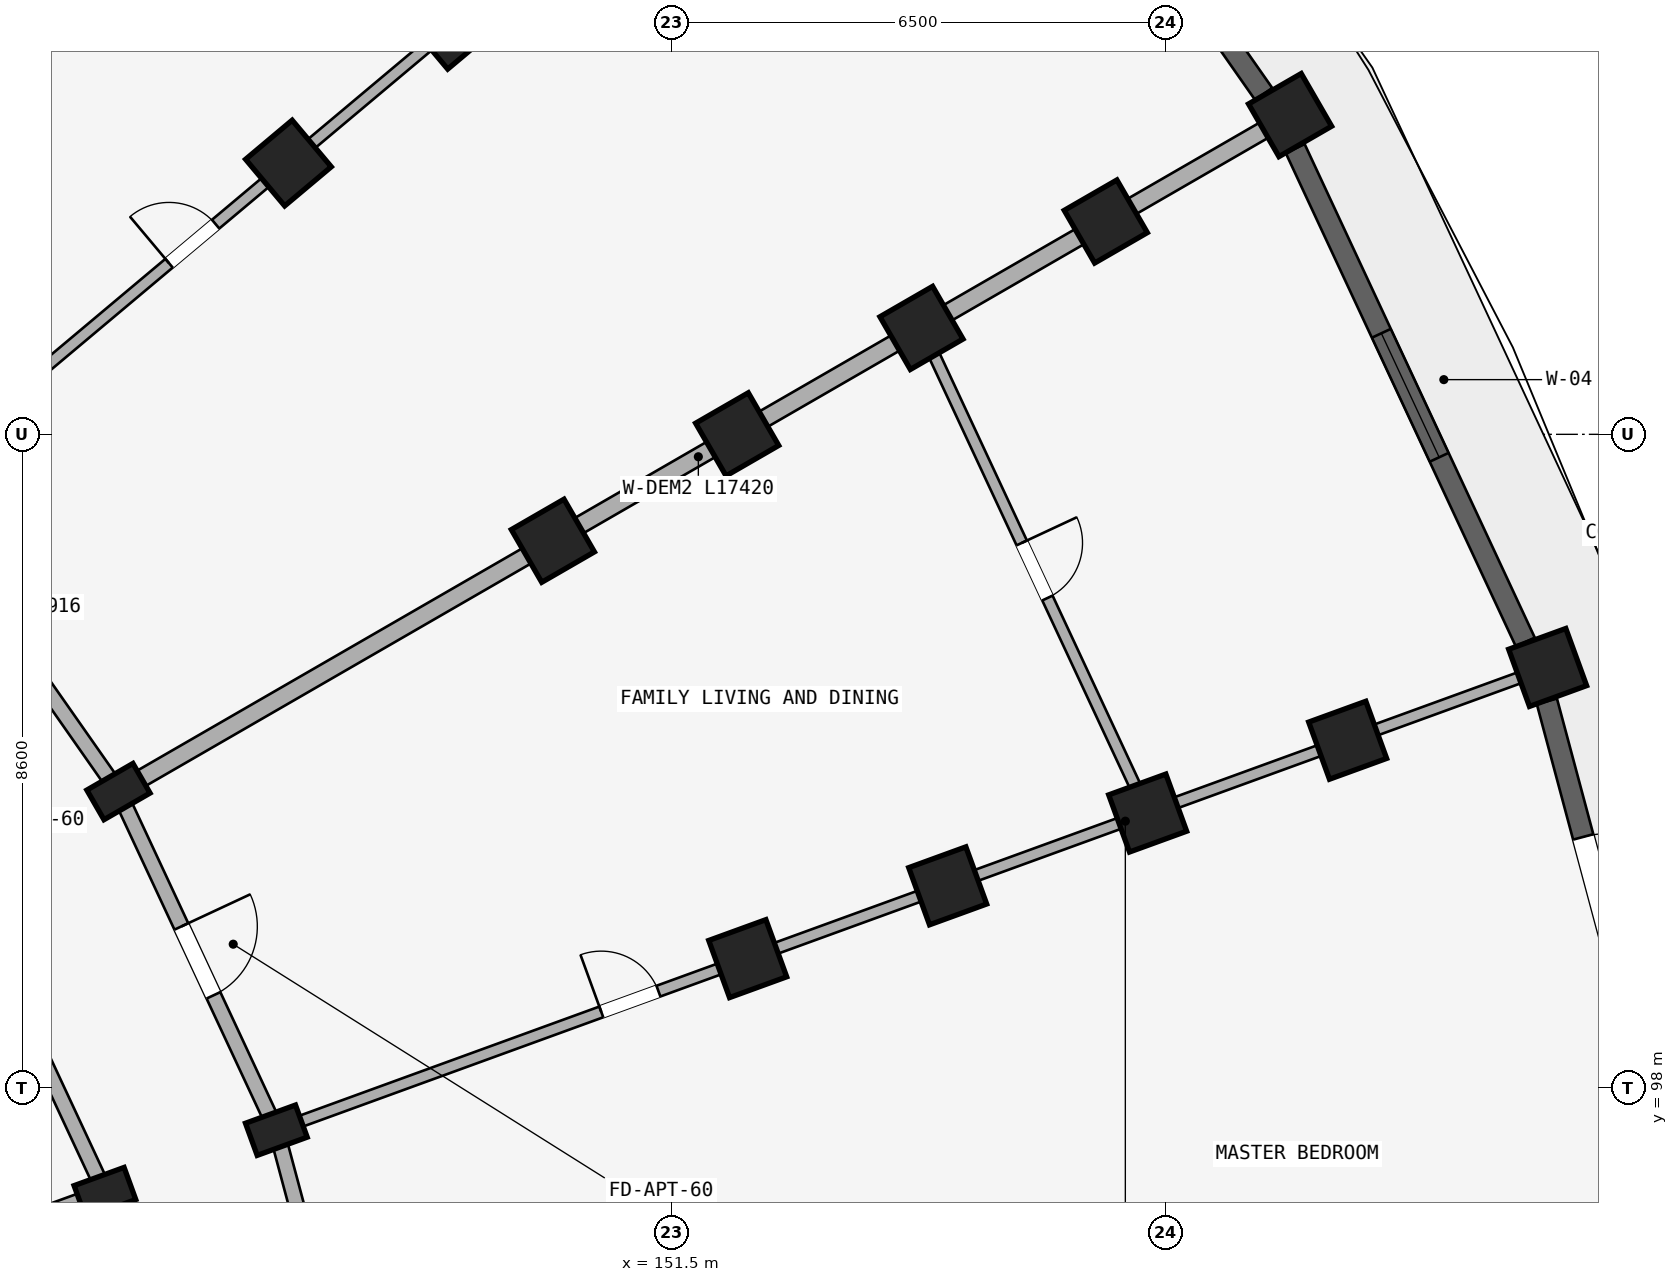
"""IFC4 building model, lengths in metres.
Left out: names, types, materials, properties, quantities, classifications, styles, units other than length and angle.
Written with IfcOpenShell. Run it as: python <this file> out.ifc"""

import sys

from ifc_helpers import new_model, si_unit, direction, frame, frame_2d, origin, origin_2d, place, context, subcontext, project, spatial, rectangle, extrude, element, fill, save


model = new_model("IFC4")
c1 = context("Model", 3, precision=1e-05, world=origin(), true_north=direction((0.0, 1.0)))
c2 = subcontext(c1, "Body", "Model", "MODEL_VIEW")
j1 = project(units=[si_unit("LENGTHUNIT", "METRE"), si_unit("PLANEANGLEUNIT", "RADIAN")], contexts=[c1])
p1 = place(None, origin())
s1 = spatial("IfcSite", under=j1, at=p1, CompositionType="ELEMENT")
p2 = place(p1, origin())
s2 = spatial("IfcBuilding", under=s1, at=p2, CompositionType="ELEMENT")
p3 = place(p2, frame((0.0, 0.0, 11.85)))
s3 = spatial("IfcBuildingStorey", under=s2, at=p3, CompositionType="ELEMENT", Elevation=11.85)
for number, where, z_axis, x_axis in (
    (1, (146.458, 110.169, 0.0), (0.0, 0.0, 1.0), (-0.643, 0.766, 0.0)),
    (2, (148.603, 111.969, 0.0), (0.0, 0.0, 1.0), (-0.643, 0.766, 0.0)),
):
    element("IfcColumn", number, at=place(p3, frame(where, z_axis=z_axis, x_axis=x_axis)), inside=s3, PredefinedType="COLUMN", context=c2, shape_type="SweptSolid", body=[
        extrude(rectangle(XDim=0.8, YDim=0.8, at=origin_2d()), origin(), (0.0, 0.0, 1.0), 2.93),
    ])
p4 = place(p3, frame((144.222, 101.9, 0.0), z_axis=(0.0, 0.0, 1.0), x_axis=(-0.5, 0.866025403784, 0.0)))
e3 = element("IfcColumn", 3, at=p4, inside=s3, PredefinedType="COLUMN", context=c2, shape_type="SweptSolid", body=[
    extrude(rectangle(XDim=0.45, YDim=0.7, at=origin_2d()), origin(), (0.0, 0.0, 1.0), 2.93),
])
for number, where, z_axis, x_axis in (
    (4, (149.938, 105.2, 0.0), (0.0, 0.0, 1.0), (-0.5, 0.866, 0.0)),
    (5, (152.363, 106.6, 0.0), (0.0, 0.0, 1.0), (-0.5, 0.866, 0.0)),
    (6, (154.787, 108.0, 0.0), (0.0, 0.0, 1.0), (-0.5, 0.866, 0.0)),
    (7, (157.212, 109.4, 0.0), (0.0, 0.0, 1.0), (-0.5, 0.866, 0.0)),
    (8, (159.637, 110.8, 0.0), (0.0, 0.0, 1.0), (-0.5, 0.866, 0.0)),
):
    element("IfcColumn", number, at=place(p3, frame(where, z_axis=z_axis, x_axis=x_axis)), inside=s3, PredefinedType="COLUMN", context=c2, shape_type="SweptSolid", body=[
        extrude(rectangle(XDim=0.8, YDim=0.8, at=origin_2d()), origin(), (0.0, 0.0, 1.0), 2.93),
    ])
for number, where, z_axis, x_axis in (
    (9, (144.044, 96.624, 0.0), (0.0, 0.0, 1.0), (-0.342, 0.94, 0.0)),
    (10, (146.299, 97.445, 0.0), (0.0, 0.0, 1.0), (-0.342, 0.94, 0.0)),
):
    element("IfcColumn", number, at=place(p3, frame(where, z_axis=z_axis, x_axis=x_axis)), inside=s3, PredefinedType="COLUMN", context=c2, shape_type="SweptSolid", body=[
        extrude(rectangle(XDim=0.45, YDim=0.7, at=origin_2d()), origin(), (0.0, 0.0, 1.0), 2.93),
    ])
for number, where, z_axis, x_axis in (
    (11, (152.501, 99.702, 0.0), (0.0, 0.0, 1.0), (-0.342, 0.94, 0.0)),
    (12, (155.132, 100.66, 0.0), (0.0, 0.0, 1.0), (-0.342, 0.94, 0.0)),
    (13, (157.764, 101.618, 0.0), (0.0, 0.0, 1.0), (-0.342, 0.94, 0.0)),
    (14, (160.395, 102.575, 0.0), (0.0, 0.0, 1.0), (-0.342, 0.94, 0.0)),
    (15, (163.026, 103.533, 0.0), (0.0, 0.0, 1.0), (-0.342, 0.94, 0.0)),
):
    element("IfcColumn", number, at=place(p3, frame(where, z_axis=z_axis, x_axis=x_axis)), inside=s3, PredefinedType="COLUMN", context=c2, shape_type="SweptSolid", body=[
        extrude(rectangle(XDim=0.8, YDim=0.8, at=origin_2d()), origin(), (0.0, 0.0, 1.0), 2.93),
    ])
p5 = place(p3, frame((141.402, 105.927, 0.0), z_axis=(0.0, 0.0, 1.0), x_axis=(0.573592335331, -0.819140911474, 0.0)))
e16 = element("IfcWall", 16, at=p5, inside=s3, PredefinedType="STANDARD", context=c2, shape_type="SweptSolid", body=[
    extrude(rectangle(XDim=4.916, YDim=0.2, at=frame_2d((2.458, 0.0))), origin(), (0.0, 0.0, 1.0), 2.372),
])
p6 = place(p3, frame((142.144, 100.7, 0.0), z_axis=(0.0, 0.0, 1.0), x_axis=(0.422617978463, -0.906307919131, 0.0)))
e17 = element("IfcWall", 17, at=p6, inside=s3, PredefinedType="STANDARD", context=c2, shape_type="SweptSolid", body=[
    extrude(rectangle(XDim=4.497, YDim=0.2, at=frame_2d((2.249, 0.0))), origin(), (0.0, 0.0, 1.0), 2.372),
])
p7 = place(p3, frame((144.222, 101.9, 0.0), z_axis=(0.0, 0.0, 1.0), x_axis=(0.422629854778, -0.906302381024, 0.0)))
e18 = element("IfcWall", 18, at=p7, inside=s3, PredefinedType="STANDARD", context=c2, shape_type="SweptSolid", body=[
    extrude(rectangle(XDim=4.915, YDim=0.2, at=frame_2d((2.458, 0.0))), origin(), (0.0, 0.0, 1.0), 2.372),
])
p8 = place(p7, frame((1.958, 0.0, 0.0)))
e19 = element("IfcOpeningElement", 19, at=p8, cuts=e18, PredefinedType="OPENING", context=c2, shape_type="SweptSolid", body=[
    extrude(rectangle(XDim=1.0, YDim=2.15, at=frame_2d((0.5, 1.075))), frame((0.0, 0.11, 0.0), z_axis=(0.0, -1.0, 0.0), x_axis=(1.0, 0.0, 0.0)), (0.0, 0.0, 1.0), 0.22),
])
p9 = place(p3, frame((144.044, 96.624, 0.0), z_axis=(0.0, 0.0, 1.0), x_axis=(0.258787642463, -0.965934240054, 0.0)))
e20 = element("IfcWall", 20, at=p9, inside=s3, PredefinedType="STANDARD", context=c2, shape_type="SweptSolid", body=[
    extrude(rectangle(XDim=4.497, YDim=0.2, at=frame_2d((2.249, 0.0))), origin(), (0.0, 0.0, 1.0), 2.372),
])
p10 = place(p9, frame((1.729, 0.0, 0.0)))
e21 = element("IfcOpeningElement", 21, at=p10, cuts=e20, PredefinedType="OPENING", context=c2, shape_type="SweptSolid", body=[
    extrude(rectangle(XDim=1.04, YDim=2.15, at=frame_2d((0.52, 1.075))), frame((0.0, 0.11, 0.0), z_axis=(0.0, -1.0, 0.0), x_axis=(1.0, 0.0, 0.0)), (0.0, 0.0, 1.0), 0.22),
])
p11 = place(p3, frame((146.299, 97.445, 0.0), z_axis=(0.0, 0.0, 1.0), x_axis=(0.258803112091, -0.965930095386, 0.0)))
e22 = element("IfcWall", 22, at=p11, inside=s3, PredefinedType="STANDARD", context=c2, shape_type="SweptSolid", body=[
    extrude(rectangle(XDim=4.916, YDim=0.2, at=frame_2d((2.458, 0.0))), origin(), (0.0, 0.0, 1.0), 2.372),
])
p12 = place(p3, frame((137.991, 109.479, 0.0), z_axis=(0.0, 0.0, 1.0), x_axis=(0.642784757967, 0.766046835987, 0.0)))
e23 = element("IfcWall", 23, at=p12, inside=s3, PredefinedType="PARTITIONING", context=c2, shape_type="SweptSolid", body=[
    extrude(rectangle(XDim=17.42, YDim=0.15, at=frame_2d((8.71, 0.0))), origin(), (0.0, 0.0, 1.0), 2.372),
])
p13 = place(p12, frame((4.45, 0.0, 0.0)))
e24 = element("IfcOpeningElement", 24, at=p13, cuts=e23, PredefinedType="OPENING", context=c2, shape_type="SweptSolid", body=[
    extrude(rectangle(XDim=0.8, YDim=2.1, at=frame_2d((0.4, 1.05))), frame((0.0, 0.085, 0.0), z_axis=(0.0, -1.0, 0.0), x_axis=(1.0, 0.0, 0.0)), (0.0, 0.0, 1.0), 0.17),
])
p14 = place(p3, frame((141.479, 105.991, 0.0), z_axis=(0.0, 0.0, 1.0), x_axis=(0.766046835987, 0.642784757967, 0.0)))
e25 = element("IfcWall", 25, at=p14, inside=s3, PredefinedType="PARTITIONING", context=c2, shape_type="SweptSolid", body=[
    extrude(rectangle(XDim=17.42, YDim=0.15, at=frame_2d((8.71, 0.0))), origin(), (0.0, 0.0, 1.0), 2.372),
])
p15 = place(p14, frame((4.45, 0.0, 0.0)))
e26 = element("IfcOpeningElement", 26, at=p15, cuts=e25, PredefinedType="OPENING", context=c2, shape_type="SweptSolid", body=[
    extrude(rectangle(XDim=0.8, YDim=2.1, at=frame_2d((0.4, 1.05))), frame((0.0, 0.085, 0.0), z_axis=(0.0, -1.0, 0.0), x_axis=(1.0, 0.0, 0.0)), (0.0, 0.0, 1.0), 0.17),
])
p16 = place(p3, frame((144.309, 101.95, 0.0), z_axis=(0.0, 0.0, 1.0), x_axis=(0.866026648973, 0.499997843263, 0.0)))
e27 = element("IfcWall", 27, at=p16, inside=s3, PredefinedType="STANDARD", context=c2, shape_type="SweptSolid", body=[
    extrude(rectangle(XDim=17.42, YDim=0.23, at=frame_2d((8.71, 0.0))), origin(), (0.0, 0.0, 1.0), 2.372),
])
p17 = place(p3, frame((137.654, 94.298, 0.0), z_axis=(0.0, 0.0, 1.0), x_axis=(0.939696231917, 0.342010221662, 0.0)))
e28 = element("IfcWall", 28, at=p17, inside=s3, PredefinedType="STANDARD", context=c2, shape_type="SweptSolid", body=[
    extrude(rectangle(XDim=6.75, YDim=0.22, at=frame_2d((3.375, 0.0))), origin(), (0.0, 0.0, 1.0), 2.372),
])
p18 = place(p3, frame((146.393, 97.479, 0.0), z_axis=(0.0, 0.0, 1.0), x_axis=(0.939691901159, 0.342022120477, 0.0)))
e29 = element("IfcWall", 29, at=p18, inside=s3, PredefinedType="PARTITIONING", context=c2, shape_type="SweptSolid", body=[
    extrude(rectangle(XDim=17.42, YDim=0.15, at=frame_2d((8.71, 0.0))), origin(), (0.0, 0.0, 1.0), 2.372),
])
p19 = place(p18, frame((4.45, 0.0, 0.0)))
e30 = element("IfcOpeningElement", 30, at=p19, cuts=e29, PredefinedType="OPENING", context=c2, shape_type="SweptSolid", body=[
    extrude(rectangle(XDim=0.8, YDim=2.1, at=frame_2d((0.4, 1.05))), frame((0.0, 0.085, 0.0), z_axis=(0.0, -1.0, 0.0), x_axis=(1.0, 0.0, 0.0)), (0.0, 0.0, 1.0), 0.17),
])
p20 = place(p3, frame((154.787, 108.0, 0.0), z_axis=(0.0, 0.0, 1.0), x_axis=(0.422640621205, -0.906297360311, 0.0)))
e31 = element("IfcWall", 31, at=p20, inside=s3, PredefinedType="PLUMBINGWALL", context=c2, shape_type="SweptSolid", body=[
    extrude(rectangle(XDim=7.042, YDim=0.15, at=frame_2d((3.521, 0.0))), origin(), (0.0, 0.0, 1.0), 2.372),
])
p21 = place(p20, frame((3.121, 0.0, 0.0)))
e32 = element("IfcOpeningElement", 32, at=p21, cuts=e31, PredefinedType="OPENING", context=c2, shape_type="SweptSolid", body=[
    extrude(rectangle(XDim=0.8, YDim=2.1, at=frame_2d((0.4, 1.05))), frame((0.0, 0.085, 0.0), z_axis=(0.0, -1.0, 0.0), x_axis=(1.0, 0.0, 0.0)), (0.0, 0.0, 1.0), 0.17),
])
p22 = place(p3, frame((155.181, 116.947, 0.0), z_axis=(0.0, 0.0, 1.0), x_axis=(0.573562972382, -0.819161471697, 0.0)))
e33 = element("IfcWall", 33, at=p22, inside=s3, PredefinedType="STANDARD", context=c2, shape_type="SweptSolid", body=[
    extrude(rectangle(XDim=7.164, YDim=0.275, at=frame_2d((3.582, 0.0))), origin(), (0.0, 0.0, 1.0), 2.372),
])
p23 = place(p22, frame((2.757, 0.0, 0.422)))
e34 = element("IfcOpeningElement", 34, at=p23, cuts=e33, PredefinedType="OPENING", context=c2, shape_type="SweptSolid", body=[
    extrude(rectangle(XDim=1.65, YDim=1.75, at=frame_2d((0.825, 0.875))), frame((0.0, 0.147, 0.0), z_axis=(0.0, -1.0, 0.0), x_axis=(1.0, 0.0, 0.0)), (0.0, 0.0, 1.0), 0.295),
])
p24 = place(p3, frame((159.704, 110.36, 0.0), z_axis=(0.0, 0.0, 1.0), x_axis=(0.422633596215, -0.906300636296, 0.0)))
e35 = element("IfcWall", 35, at=p24, inside=s3, PredefinedType="STANDARD", context=c2, shape_type="SweptSolid", body=[
    extrude(rectangle(XDim=7.164, YDim=0.275, at=frame_2d((3.582, 0.0))), origin(), (0.0, 0.0, 1.0), 2.372),
])
p25 = place(p24, frame((2.682, 0.0, 0.522)))
e36 = element("IfcOpeningElement", 36, at=p25, cuts=e35, PredefinedType="OPENING", context=c2, shape_type="SweptSolid", body=[
    extrude(rectangle(XDim=1.8, YDim=1.65, at=frame_2d((0.9, 0.825))), frame((0.0, 0.147, 0.0), z_axis=(0.0, -1.0, 0.0), x_axis=(1.0, 0.0, 0.0)), (0.0, 0.0, 1.0), 0.295),
])
p26 = place(p3, frame((163.016, 103.088, 0.0), z_axis=(0.0, 0.0, 1.0), x_axis=(0.258826933296, -0.965923712619, 0.0)))
e37 = element("IfcWall", 37, at=p26, inside=s3, PredefinedType="STANDARD", context=c2, shape_type="SweptSolid", body=[
    extrude(rectangle(XDim=7.164, YDim=0.275, at=frame_2d((3.582, 0.0))), origin(), (0.0, 0.0, 1.0), 2.372),
])
p27 = place(p26, frame((4.69, 0.0, 0.372)))
e38 = element("IfcOpeningElement", 38, at=p27, cuts=e37, PredefinedType="OPENING", context=c2, shape_type="SweptSolid", body=[
    extrude(rectangle(XDim=1.2, YDim=1.5, at=frame_2d((0.6, 0.75))), frame((0.0, 0.147, 0.0), z_axis=(0.0, -1.0, 0.0), x_axis=(1.0, 0.0, 0.0)), (0.0, 0.0, 1.0), 0.295),
])
p28 = place(p26, frame((1.847, 0.0, 0.0)))
e39 = element("IfcOpeningElement", 39, at=p28, cuts=e37, PredefinedType="OPENING", context=c2, shape_type="SweptSolid", body=[
    extrude(rectangle(XDim=1.32, YDim=2.15, at=frame_2d((0.66, 1.075))), frame((0.0, 0.147, 0.0), z_axis=(0.0, -1.0, 0.0), x_axis=(1.0, 0.0, 0.0)), (0.0, 0.0, 1.0), 0.295),
])
p29 = place(p25, origin())
e40 = element("IfcWindow", 40, at=p29, inside=s3, PartitioningType="DOUBLE_PANEL_VERTICAL", PredefinedType="WINDOW", context=c2, shape_type="SweptSolid", body=[
    extrude(rectangle(XDim=1.8, YDim=1.65, at=frame_2d((0.9, 0.825))), frame((0.0, 0.03, 0.0), z_axis=(0.0, -1.0, 0.0), x_axis=(1.0, 0.0, 0.0)), (0.0, 0.0, 1.0), 0.06),
])
fill(e36, e40)
p30 = place(p15, origin())
e41 = element("IfcDoor", 41, at=p30, inside=s3, OperationType="SINGLE_SWING_LEFT", PredefinedType="DOOR", context=c2, shape_type="SweptSolid", body=[
    extrude(rectangle(XDim=0.8, YDim=2.1, at=frame_2d((0.4, 1.05))), frame((0.0, 0.025, 0.0), z_axis=(0.0, -1.0, 0.0), x_axis=(1.0, 0.0, 0.0)), (0.0, 0.0, 1.0), 0.05),
])
fill(e26, e41)
p31 = place(p19, origin())
e42 = element("IfcDoor", 42, at=p31, inside=s3, OperationType="SINGLE_SWING_LEFT", PredefinedType="DOOR", context=c2, shape_type="SweptSolid", body=[
    extrude(rectangle(XDim=0.8, YDim=2.1, at=frame_2d((0.4, 1.05))), frame((0.0, 0.025, 0.0), z_axis=(0.0, -1.0, 0.0), x_axis=(1.0, 0.0, 0.0)), (0.0, 0.0, 1.0), 0.05),
])
fill(e30, e42)
p32 = place(p8, frame((1.0, 0.0, 0.0), z_axis=(0.0, 0.0, 1.0), x_axis=(-1.0, 0.0, 0.0)))
e43 = element("IfcDoor", 43, at=p32, inside=s3, OperationType="SINGLE_SWING_RIGHT", PredefinedType="DOOR", context=c2, shape_type="SweptSolid", body=[
    extrude(rectangle(XDim=1.0, YDim=2.15, at=frame_2d((0.5, 1.075))), frame((0.0, 0.025, 0.0), z_axis=(0.0, -1.0, 0.0), x_axis=(1.0, 0.0, 0.0)), (0.0, 0.0, 1.0), 0.05),
])
fill(e19, e43)
p33 = place(p21, origin())
e44 = element("IfcDoor", 44, at=p33, inside=s3, OperationType="SINGLE_SWING_LEFT", PredefinedType="DOOR", context=c2, shape_type="SweptSolid", body=[
    extrude(rectangle(XDim=0.8, YDim=2.1, at=frame_2d((0.4, 1.05))), frame((0.0, 0.025, 0.0), z_axis=(0.0, -1.0, 0.0), x_axis=(1.0, 0.0, 0.0)), (0.0, 0.0, 1.0), 0.05),
])
fill(e32, e44)
p34 = place(p28, origin())
e45 = element("IfcDoor", 45, at=p34, inside=s3, OperationType="SINGLE_SWING_RIGHT", PredefinedType="DOOR", context=c2, shape_type="SweptSolid", body=[
    extrude(rectangle(XDim=1.32, YDim=2.15, at=frame_2d((0.66, 1.075))), frame((0.0, 0.025, 0.0), z_axis=(0.0, -1.0, 0.0), x_axis=(1.0, 0.0, 0.0)), (0.0, 0.0, 1.0), 0.05),
])
fill(e39, e45)
save(model, sys.argv[1])
